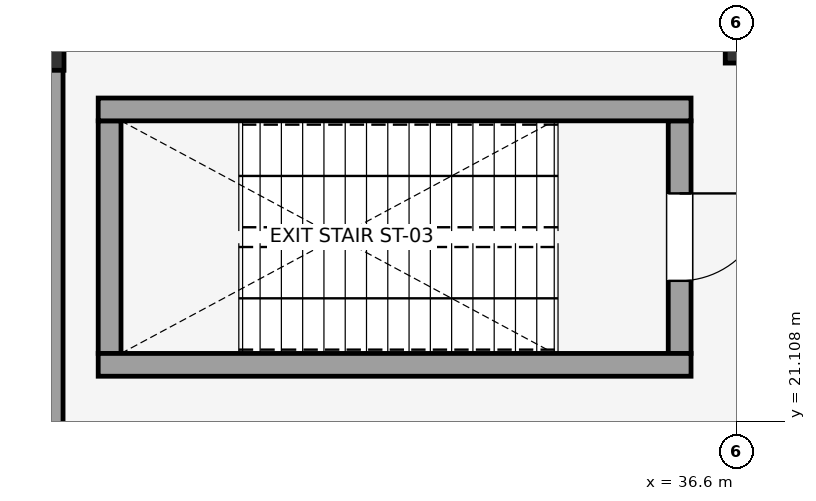
"""IFC4 building model, lengths in metres.
Left out: names, types, materials, properties, quantities, classifications, styles, units other than length and angle.
Written with IfcOpenShell. Run it as: python <this file> out.ifc"""

import sys

from ifc_helpers import new_model, si_unit, direction, frame, frame_2d, origin, origin_2d, place, context, subcontext, project, spatial, rectangle, i_section, extrude, element, fill, save


model = new_model("IFC4")
c1 = context("Model", 3, precision=1e-05, world=origin(), true_north=direction((0.0, 1.0)))
c2 = subcontext(c1, "Body", "Model", "MODEL_VIEW")
j1 = project(units=[si_unit("LENGTHUNIT", "METRE"), si_unit("PLANEANGLEUNIT", "RADIAN")], contexts=[c1])
p1 = place(None, origin())
s1 = spatial("IfcSite", under=j1, at=p1, CompositionType="ELEMENT")
p2 = place(p1, origin())
s2 = spatial("IfcBuilding", under=s1, at=p2, CompositionType="ELEMENT")
p3 = place(p2, frame((0.0, 0.0, 9.0)))
s3 = spatial("IfcBuildingStorey", under=s2, at=p3, CompositionType="ELEMENT", Elevation=9.0)
p4 = place(p3, frame((27.6, 26.0, 0.0), z_axis=(0.0, 0.0, 1.0), x_axis=(1.0, 0.0, 0.0)))
e1 = element("IfcColumn", 1, at=p4, inside=s3, PredefinedType="COLUMN", context=c2, shape_type="SweptSolid", body=[
    extrude(i_section(OverallWidth=0.3, OverallDepth=0.55, WebThickness=0.015, FlangeThickness=0.029, FilletRadius=0.027, at=origin_2d()), origin(), (0.0, 0.0, 1.0), 4.8),
])
p5 = place(p3, frame((36.6, 26.0, 0.0), z_axis=(0.0, 0.0, 1.0), x_axis=(1.0, 0.0, 0.0)))
e2 = element("IfcColumn", 2, at=p5, inside=s3, PredefinedType="COLUMN", context=c2, shape_type="SweptSolid", body=[
    extrude(i_section(OverallWidth=0.3, OverallDepth=0.36, WebThickness=0.012, FlangeThickness=0.022, FilletRadius=0.027, at=origin_2d()), origin(), (0.0, 0.0, 1.0), 4.8),
])
p6 = place(p3, frame((27.6, 26.275, 0.0), z_axis=(0.0, 0.0, 1.0), x_axis=(0.0, -1.0, 0.0)))
e3 = element("IfcWall", 3, at=p6, inside=s3, PredefinedType="SOLIDWALL", context=c2, shape_type="SweptSolid", body=[
    extrude(rectangle(XDim=8.129, YDim=0.275, at=frame_2d((4.064, 0.0))), origin(), (0.0, 0.0, 1.0), 3.42),
])
p7 = place(p3, frame((35.85, 25.06, 0.0), z_axis=(0.0, 0.0, 1.0), x_axis=(0.0, -1.0, 0.0)))
e4 = element("IfcWall", 4, at=p7, inside=s3, PredefinedType="SHEAR", context=c2, shape_type="SweptSolid", body=[
    extrude(rectangle(XDim=3.06, YDim=0.3, at=frame_2d((1.53, 0.0))), origin(), (0.0, 0.0, 1.0), 4.8),
])
p8 = place(p7, frame((0.955, 0.0, 0.0)))
e5 = element("IfcOpeningElement", 5, at=p8, cuts=e4, PredefinedType="OPENING", context=c2, shape_type="SweptSolid", body=[
    extrude(rectangle(XDim=1.15, YDim=2.15, at=frame_2d((0.575, 1.075))), frame((0.0, 0.16, 0.0), z_axis=(0.0, -1.0, 0.0), x_axis=(1.0, 0.0, 0.0)), (0.0, 0.0, 1.0), 0.32),
])
p9 = place(p3, frame((28.35, 25.06, 0.0), z_axis=(0.0, 0.0, 1.0), x_axis=(0.0, -1.0, 0.0)))
e6 = element("IfcWall", 6, at=p9, inside=s3, PredefinedType="SHEAR", context=c2, shape_type="SweptSolid", body=[
    extrude(rectangle(XDim=3.06, YDim=0.3, at=frame_2d((1.53, 0.0))), origin(), (0.0, 0.0, 1.0), 4.8),
])
for number, where, z_axis, x_axis in (
    (7, (36.0, 25.21, 0.0), (0.0, 0.0, 1.0), (-1.0, 0.0, 0.0)),
    (8, (36.0, 21.85, 0.0), (0.0, 0.0, 1.0), (-1.0, 0.0, 0.0)),
):
    element("IfcWall", number, at=place(p3, frame(where, z_axis=z_axis, x_axis=x_axis)), inside=s3, PredefinedType="SHEAR", context=c2, shape_type="SweptSolid", body=[
        extrude(rectangle(XDim=7.8, YDim=0.3, at=frame_2d((3.9, 0.0))), origin(), (0.0, 0.0, 1.0), 4.8),
    ])
p10 = place(p8, origin())
e9 = element("IfcDoor", 9, at=p10, inside=s3, OperationType="SINGLE_SWING_LEFT", PredefinedType="DOOR", context=c2, shape_type="SweptSolid", body=[
    extrude(rectangle(XDim=1.15, YDim=2.15, at=frame_2d((0.575, 1.075))), frame((0.0, 0.025, 0.0), z_axis=(0.0, -1.0, 0.0), x_axis=(1.0, 0.0, 0.0)), (0.0, 0.0, 1.0), 0.05),
])
fill(e5, e9)
save(model, sys.argv[1])
